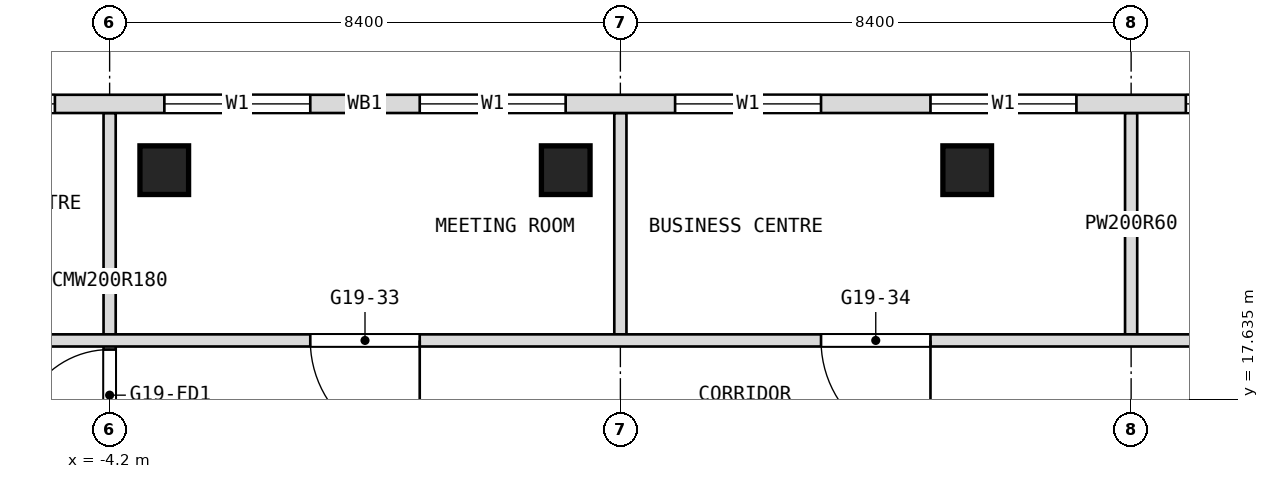
"""IFC4 building model, lengths in metres.
Left out: names, types, materials, properties, quantities, classifications, styles, units other than length and angle.
Written with IfcOpenShell. Run it as: python <this file> out.ifc"""

import sys

from ifc_helpers import new_model, si_unit, direction, frame, frame_2d, origin, origin_2d, place, context, subcontext, project, spatial, rectangle, extrude, element, fill, save


model = new_model("IFC4")
c1 = context("Model", 3, precision=1e-05, world=origin(), true_north=direction((0.0, 1.0)))
c2 = subcontext(c1, "Body", "Model", "MODEL_VIEW")
j1 = project(units=[si_unit("LENGTHUNIT", "METRE"), si_unit("PLANEANGLEUNIT", "RADIAN")], contexts=[c1])
p1 = place(None, origin())
s1 = spatial("IfcSite", under=j1, at=p1, CompositionType="ELEMENT")
p2 = place(p1, origin())
s2 = spatial("IfcBuilding", under=s1, at=p2, CompositionType="ELEMENT")
p3 = place(p2, frame((0.0, 0.0, 220.1)))
s3 = spatial("IfcBuildingStorey", under=s2, at=p3, CompositionType="ELEMENT", Elevation=220.1)
for number, where, z_axis, x_axis in (
    (1, (-3.302, 21.4, 0.0), (0.0, 0.0, 1.0), (1.0, 0.0, 0.0)),
    (2, (3.302, 21.4, 0.0), (0.0, 0.0, 1.0), (1.0, 0.0, 0.0)),
    (3, (9.904, 21.4, 0.0), (0.0, 0.0, 1.0), (1.0, 0.0, 0.0)),
):
    element("IfcColumn", number, at=place(p3, frame(where, z_axis=z_axis, x_axis=x_axis)), inside=s3, PredefinedType="COLUMN", context=c2, shape_type="SweptSolid", body=[
        extrude(rectangle(XDim=0.8, YDim=0.8, at=origin_2d()), origin(), (0.0, 0.0, 1.0), 3.6),
    ])
for number, where, z_axis, x_axis in (
    (4, (12.6, 18.7, 0.0), (0.0, 0.0, 1.0), (0.0, 1.0, 0.0)),
    (5, (4.2, 18.7, 0.0), (0.0, 0.0, 1.0), (0.0, 1.0, 0.0)),
):
    element("IfcWall", number, at=place(p3, frame(where, z_axis=z_axis, x_axis=x_axis)), inside=s3, PredefinedType="PARTITIONING", context=c2, shape_type="SweptSolid", body=[
        extrude(rectangle(XDim=3.64, YDim=0.2, at=frame_2d((1.82, 0.0))), origin(), (0.0, 0.0, 1.0), 3.34),
    ])
p4 = place(p3, frame((-4.2, 16.8, 0.0), z_axis=(0.0, 0.0, 1.0), x_axis=(0.0, 1.0, 0.0)))
e6 = element("IfcWall", 6, at=p4, inside=s3, PredefinedType="PARTITIONING", context=c2, shape_type="SweptSolid", body=[
    extrude(rectangle(XDim=5.54, YDim=0.2, at=frame_2d((2.77, 0.0))), origin(), (0.0, 0.0, 1.0), 3.34),
])
p5 = place(p4, frame((0.15, 0.0, 0.0)))
e7 = element("IfcOpeningElement", 7, at=p5, cuts=e6, PredefinedType="OPENING", context=c2, shape_type="SweptSolid", body=[
    extrude(rectangle(XDim=1.5, YDim=2.1, at=frame_2d((0.75, 1.05))), frame((0.0, 0.1, 0.0), z_axis=(0.0, -1.0, 0.0), x_axis=(1.0, 0.0, 0.0)), (0.0, 0.0, 1.0), 0.2),
])
p6 = place(p3, frame((-16.9, 18.6, 0.0), z_axis=(0.0, 0.0, 1.0), x_axis=(1.0, 0.0, 0.0)))
e8 = element("IfcWall", 8, at=p6, inside=s3, PredefinedType="PARTITIONING", context=c2, shape_type="SweptSolid", body=[
    extrude(rectangle(XDim=33.8, YDim=0.2, at=frame_2d((16.9, 0.0))), origin(), (0.0, 0.0, 1.0), 3.34),
])
p7 = place(p6, frame((1.7, 0.0, 0.0)))
e9 = element("IfcOpeningElement", 9, at=p7, cuts=e8, PredefinedType="OPENING", context=c2, shape_type="SweptSolid", body=[
    extrude(rectangle(XDim=1.0, YDim=2.1, at=frame_2d((0.5, 1.05))), frame((0.0, 0.1, 0.0), z_axis=(0.0, -1.0, 0.0), x_axis=(1.0, 0.0, 0.0)), (0.0, 0.0, 1.0), 0.2),
])
p8 = place(p6, frame((7.6, 0.0, 0.0)))
e10 = element("IfcOpeningElement", 10, at=p8, cuts=e8, PredefinedType="OPENING", context=c2, shape_type="SweptSolid", body=[
    extrude(rectangle(XDim=1.8, YDim=2.1, at=frame_2d((0.9, 1.05))), frame((0.0, 0.1, 0.0), z_axis=(0.0, -1.0, 0.0), x_axis=(1.0, 0.0, 0.0)), (0.0, 0.0, 1.0), 0.2),
])
p9 = place(p6, frame((16.0, 0.0, 0.0)))
e11 = element("IfcOpeningElement", 11, at=p9, cuts=e8, PredefinedType="OPENING", context=c2, shape_type="SweptSolid", body=[
    extrude(rectangle(XDim=1.8, YDim=2.1, at=frame_2d((0.9, 1.05))), frame((0.0, 0.1, 0.0), z_axis=(0.0, -1.0, 0.0), x_axis=(1.0, 0.0, 0.0)), (0.0, 0.0, 1.0), 0.2),
])
p10 = place(p6, frame((24.4, 0.0, 0.0)))
e12 = element("IfcOpeningElement", 12, at=p10, cuts=e8, PredefinedType="OPENING", context=c2, shape_type="SweptSolid", body=[
    extrude(rectangle(XDim=1.8, YDim=2.1, at=frame_2d((0.9, 1.05))), frame((0.0, 0.1, 0.0), z_axis=(0.0, -1.0, 0.0), x_axis=(1.0, 0.0, 0.0)), (0.0, 0.0, 1.0), 0.2),
])
p11 = place(p6, frame((31.1, 0.0, 0.0)))
e13 = element("IfcOpeningElement", 13, at=p11, cuts=e8, PredefinedType="OPENING", context=c2, shape_type="SweptSolid", body=[
    extrude(rectangle(XDim=1.0, YDim=2.1, at=frame_2d((0.5, 1.05))), frame((0.0, 0.1, 0.0), z_axis=(0.0, -1.0, 0.0), x_axis=(1.0, 0.0, 0.0)), (0.0, 0.0, 1.0), 0.2),
])
p12 = place(p3, frame((19.206, 22.49, 0.0), z_axis=(0.0, 0.0, 1.0), x_axis=(-1.0, 0.0, 0.0)))
e14 = element("IfcWall", 14, at=p12, inside=s3, PredefinedType="NOTDEFINED", context=c2, shape_type="SweptSolid", body=[
    extrude(rectangle(XDim=38.412, YDim=0.3, at=frame_2d((19.206, 0.0))), origin(), (0.0, 0.0, 1.0), 3.6),
])
p13 = place(p12, frame((3.306, 0.0, 0.9)))
e15 = element("IfcOpeningElement", 15, at=p13, cuts=e14, PredefinedType="OPENING", context=c2, shape_type="SweptSolid", body=[
    extrude(rectangle(XDim=2.4, YDim=2.1, at=frame_2d((1.2, 1.05))), frame((0.0, 0.15, 0.0), z_axis=(0.0, -1.0, 0.0), x_axis=(1.0, 0.0, 0.0)), (0.0, 0.0, 1.0), 0.3),
])
p14 = place(p12, frame((7.506, 0.0, 0.9)))
e16 = element("IfcOpeningElement", 16, at=p14, cuts=e14, PredefinedType="OPENING", context=c2, shape_type="SweptSolid", body=[
    extrude(rectangle(XDim=2.4, YDim=2.1, at=frame_2d((1.2, 1.05))), frame((0.0, 0.15, 0.0), z_axis=(0.0, -1.0, 0.0), x_axis=(1.0, 0.0, 0.0)), (0.0, 0.0, 1.0), 0.3),
])
p15 = place(p12, frame((11.706, 0.0, 0.9)))
e17 = element("IfcOpeningElement", 17, at=p15, cuts=e14, PredefinedType="OPENING", context=c2, shape_type="SweptSolid", body=[
    extrude(rectangle(XDim=2.4, YDim=2.1, at=frame_2d((1.2, 1.05))), frame((0.0, 0.15, 0.0), z_axis=(0.0, -1.0, 0.0), x_axis=(1.0, 0.0, 0.0)), (0.0, 0.0, 1.0), 0.3),
])
p16 = place(p12, frame((15.906, 0.0, 0.9)))
e18 = element("IfcOpeningElement", 18, at=p16, cuts=e14, PredefinedType="OPENING", context=c2, shape_type="SweptSolid", body=[
    extrude(rectangle(XDim=2.4, YDim=2.1, at=frame_2d((1.2, 1.05))), frame((0.0, 0.15, 0.0), z_axis=(0.0, -1.0, 0.0), x_axis=(1.0, 0.0, 0.0)), (0.0, 0.0, 1.0), 0.3),
])
p17 = place(p12, frame((20.106, 0.0, 0.9)))
e19 = element("IfcOpeningElement", 19, at=p17, cuts=e14, PredefinedType="OPENING", context=c2, shape_type="SweptSolid", body=[
    extrude(rectangle(XDim=2.4, YDim=2.1, at=frame_2d((1.2, 1.05))), frame((0.0, 0.15, 0.0), z_axis=(0.0, -1.0, 0.0), x_axis=(1.0, 0.0, 0.0)), (0.0, 0.0, 1.0), 0.3),
])
p18 = place(p12, frame((24.306, 0.0, 0.9)))
e20 = element("IfcOpeningElement", 20, at=p18, cuts=e14, PredefinedType="OPENING", context=c2, shape_type="SweptSolid", body=[
    extrude(rectangle(XDim=2.4, YDim=2.1, at=frame_2d((1.2, 1.05))), frame((0.0, 0.15, 0.0), z_axis=(0.0, -1.0, 0.0), x_axis=(1.0, 0.0, 0.0)), (0.0, 0.0, 1.0), 0.3),
])
p19 = place(p12, frame((28.506, 0.0, 0.9)))
e21 = element("IfcOpeningElement", 21, at=p19, cuts=e14, PredefinedType="OPENING", context=c2, shape_type="SweptSolid", body=[
    extrude(rectangle(XDim=2.4, YDim=2.1, at=frame_2d((1.2, 1.05))), frame((0.0, 0.15, 0.0), z_axis=(0.0, -1.0, 0.0), x_axis=(1.0, 0.0, 0.0)), (0.0, 0.0, 1.0), 0.3),
])
p20 = place(p12, frame((32.706, 0.0, 0.9)))
e22 = element("IfcOpeningElement", 22, at=p20, cuts=e14, PredefinedType="OPENING", context=c2, shape_type="SweptSolid", body=[
    extrude(rectangle(XDim=2.4, YDim=2.1, at=frame_2d((1.2, 1.05))), frame((0.0, 0.15, 0.0), z_axis=(0.0, -1.0, 0.0), x_axis=(1.0, 0.0, 0.0)), (0.0, 0.0, 1.0), 0.3),
])
p21 = place(p9, origin())
e23 = element("IfcDoor", 23, at=p21, inside=s3, OperationType="DOUBLE_DOOR_SINGLE_SWING", PredefinedType="DOOR", context=c2, shape_type="SweptSolid", body=[
    extrude(rectangle(XDim=1.8, YDim=2.1, at=frame_2d((0.9, 1.05))), frame((0.0, 0.025, 0.0), z_axis=(0.0, -1.0, 0.0), x_axis=(1.0, 0.0, 0.0)), (0.0, 0.0, 1.0), 0.05),
])
fill(e11, e23)
p22 = place(p10, origin())
e24 = element("IfcDoor", 24, at=p22, inside=s3, OperationType="DOUBLE_DOOR_SINGLE_SWING", PredefinedType="DOOR", context=c2, shape_type="SweptSolid", body=[
    extrude(rectangle(XDim=1.8, YDim=2.1, at=frame_2d((0.9, 1.05))), frame((0.0, 0.025, 0.0), z_axis=(0.0, -1.0, 0.0), x_axis=(1.0, 0.0, 0.0)), (0.0, 0.0, 1.0), 0.05),
])
fill(e12, e24)
p23 = place(p13, origin())
e25 = element("IfcWindow", 25, at=p23, inside=s3, PartitioningType="SINGLE_PANEL", PredefinedType="WINDOW", context=c2, shape_type="SweptSolid", body=[
    extrude(rectangle(XDim=2.4, YDim=2.1, at=frame_2d((1.2, 1.05))), frame((0.0, 0.03, 0.0), z_axis=(0.0, -1.0, 0.0), x_axis=(1.0, 0.0, 0.0)), (0.0, 0.0, 1.0), 0.06),
])
fill(e15, e25)
p24 = place(p14, origin())
e26 = element("IfcWindow", 26, at=p24, inside=s3, PartitioningType="SINGLE_PANEL", PredefinedType="WINDOW", context=c2, shape_type="SweptSolid", body=[
    extrude(rectangle(XDim=2.4, YDim=2.1, at=frame_2d((1.2, 1.05))), frame((0.0, 0.03, 0.0), z_axis=(0.0, -1.0, 0.0), x_axis=(1.0, 0.0, 0.0)), (0.0, 0.0, 1.0), 0.06),
])
fill(e16, e26)
p25 = place(p15, origin())
e27 = element("IfcWindow", 27, at=p25, inside=s3, PartitioningType="SINGLE_PANEL", PredefinedType="WINDOW", context=c2, shape_type="SweptSolid", body=[
    extrude(rectangle(XDim=2.4, YDim=2.1, at=frame_2d((1.2, 1.05))), frame((0.0, 0.03, 0.0), z_axis=(0.0, -1.0, 0.0), x_axis=(1.0, 0.0, 0.0)), (0.0, 0.0, 1.0), 0.06),
])
fill(e17, e27)
p26 = place(p16, origin())
e28 = element("IfcWindow", 28, at=p26, inside=s3, PartitioningType="SINGLE_PANEL", PredefinedType="WINDOW", context=c2, shape_type="SweptSolid", body=[
    extrude(rectangle(XDim=2.4, YDim=2.1, at=frame_2d((1.2, 1.05))), frame((0.0, 0.03, 0.0), z_axis=(0.0, -1.0, 0.0), x_axis=(1.0, 0.0, 0.0)), (0.0, 0.0, 1.0), 0.06),
])
fill(e18, e28)
p27 = place(p17, origin())
e29 = element("IfcWindow", 29, at=p27, inside=s3, PartitioningType="SINGLE_PANEL", PredefinedType="WINDOW", context=c2, shape_type="SweptSolid", body=[
    extrude(rectangle(XDim=2.4, YDim=2.1, at=frame_2d((1.2, 1.05))), frame((0.0, 0.03, 0.0), z_axis=(0.0, -1.0, 0.0), x_axis=(1.0, 0.0, 0.0)), (0.0, 0.0, 1.0), 0.06),
])
fill(e19, e29)
p28 = place(p18, origin())
e30 = element("IfcWindow", 30, at=p28, inside=s3, PartitioningType="SINGLE_PANEL", PredefinedType="WINDOW", context=c2, shape_type="SweptSolid", body=[
    extrude(rectangle(XDim=2.4, YDim=2.1, at=frame_2d((1.2, 1.05))), frame((0.0, 0.03, 0.0), z_axis=(0.0, -1.0, 0.0), x_axis=(1.0, 0.0, 0.0)), (0.0, 0.0, 1.0), 0.06),
])
fill(e20, e30)
p29 = place(p5, origin())
e31 = element("IfcDoor", 31, at=p29, inside=s3, OperationType="DOUBLE_DOOR_DOUBLE_SWING", PredefinedType="DOOR", context=c2, shape_type="SweptSolid", body=[
    extrude(rectangle(XDim=1.5, YDim=2.1, at=frame_2d((0.75, 1.05))), frame((0.0, 0.025, 0.0), z_axis=(0.0, -1.0, 0.0), x_axis=(1.0, 0.0, 0.0)), (0.0, 0.0, 1.0), 0.05),
])
fill(e7, e31)
save(model, sys.argv[1])
